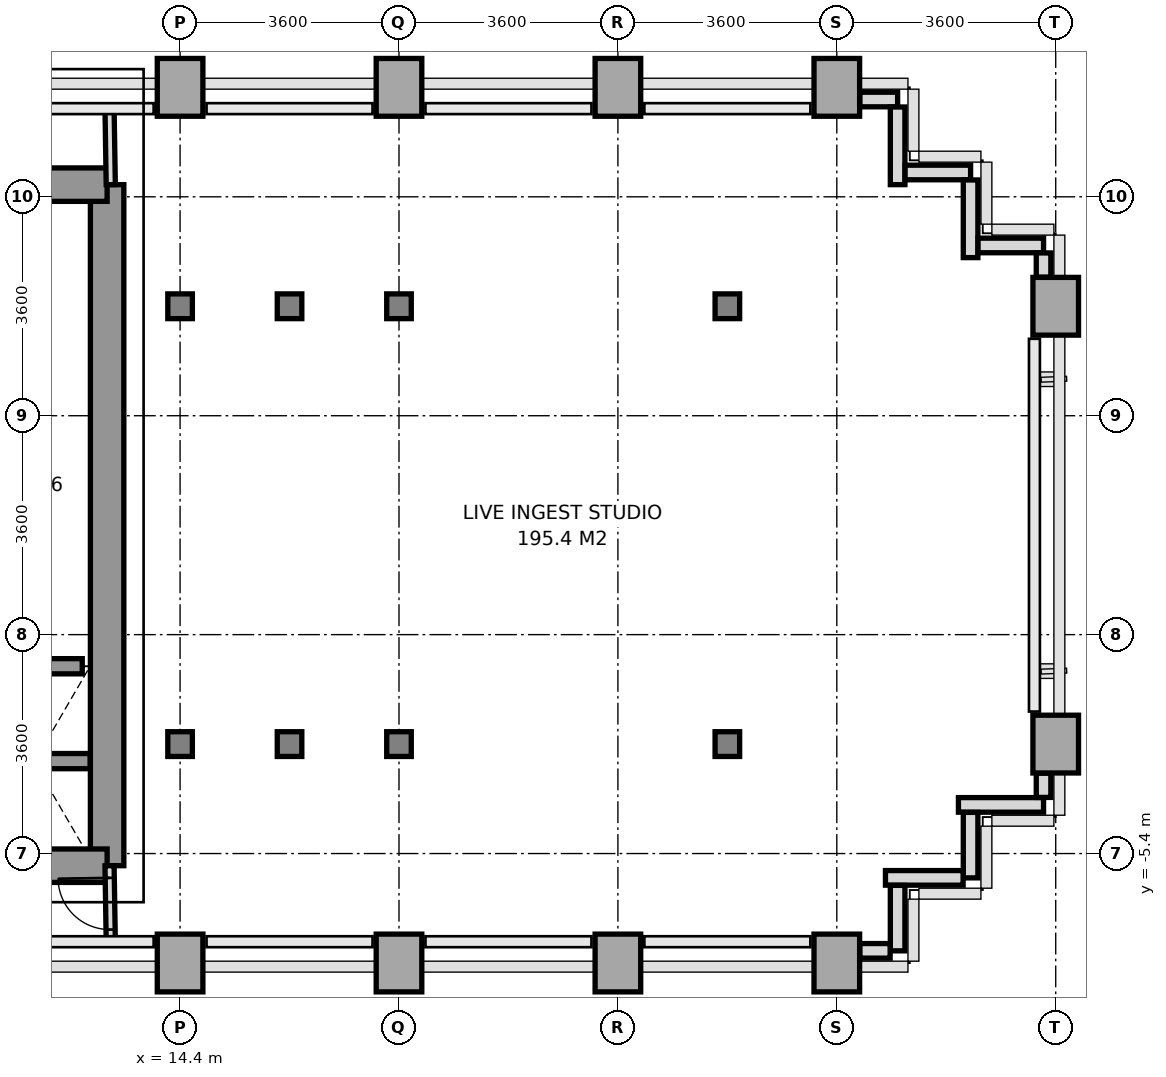
"""IFC4 building model, lengths in metres.
Left out: names, types, materials, properties, quantities, classifications, styles, units other than length and angle.
Written with IfcOpenShell. Run it as: python <this file> out.ifc"""

import sys

from ifc_helpers import new_model, si_unit, direction, frame, frame_2d, origin, origin_2d, place, context, subcontext, project, spatial, rectangle, i_section, extrude, source, transform, mapped, element, fill, save


model = new_model("IFC4")
c1 = context("Model", 3, precision=1e-05, world=origin(), true_north=direction((0.0, 1.0)))
c2 = subcontext(c1, "Body", "Model", "MODEL_VIEW")
j1 = project(units=[si_unit("LENGTHUNIT", "METRE"), si_unit("PLANEANGLEUNIT", "RADIAN")], contexts=[c1])
p1 = place(None, origin())
s1 = spatial("IfcSite", under=j1, at=p1, CompositionType="ELEMENT")
p2 = place(p1, origin())
s2 = spatial("IfcBuilding", under=s1, at=p2, CompositionType="ELEMENT")
p3 = place(p2, frame((0.0, 0.0, 37.4)))
s3 = spatial("IfcBuildingStorey", under=s2, at=p3, CompositionType="ELEMENT", Elevation=37.4)
m1 = source(origin(), c2, "Body", "SweptSolid", [
    extrude(rectangle(XDim=0.75, YDim=0.95, at=origin_2d()), origin(), (0.0, 0.0, 1.0), 3.2),
])
p4 = place(p3, frame((14.4, -7.2, 0.0), z_axis=(0.0, 0.0, 1.0), x_axis=(1.0, 0.0, 0.0)))
e1 = element("IfcColumn", 1, at=p4, inside=s3, PredefinedType="COLUMN", context=c2, shape_type="MappedRepresentation", body=[
    mapped(m1, transform((0.0, 0.0, 0.0), x_axis=(1.0, 0.0, 0.0), y_axis=(0.0, 1.0, 0.0), z_axis=(0.0, 0.0, 1.0), scale=1.0)),
])
m2 = source(origin(), c2, "Body", "SweptSolid", [
    extrude(i_section(OverallWidth=0.404, OverallDepth=0.407, WebThickness=0.022, FlangeThickness=0.035, at=origin_2d()), origin(), (0.0, 0.0, 1.0), 3.2),
])
for number, where, z_axis, x_axis in (
    (2, (14.4, -3.6, 0.0), (0.0, 0.0, 1.0), (1.0, 0.0, 0.0)),
    (3, (14.4, 3.6, 0.0), (0.0, 0.0, 1.0), (1.0, 0.0, 0.0)),
):
    element("IfcColumn", number, at=place(p3, frame(where, z_axis=z_axis, x_axis=x_axis)), inside=s3, PredefinedType="COLUMN", context=c2, shape_type="MappedRepresentation", body=[
        mapped(m2, transform((0.0, 0.0, 0.0), x_axis=(1.0, 0.0, 0.0), y_axis=(0.0, 1.0, 0.0), z_axis=(0.0, 0.0, 1.0), scale=1.0)),
    ])
p5 = place(p3, frame((14.4, 7.2, 0.0), z_axis=(0.0, 0.0, 1.0), x_axis=(1.0, 0.0, 0.0)))
e4 = element("IfcColumn", 4, at=p5, inside=s3, PredefinedType="COLUMN", context=c2, shape_type="MappedRepresentation", body=[
    mapped(m1, transform((0.0, 0.0, 0.0), x_axis=(1.0, 0.0, 0.0), y_axis=(0.0, 1.0, 0.0), z_axis=(0.0, 0.0, 1.0), scale=1.0)),
])
for number, where, z_axis, x_axis in (
    (5, (16.2, -3.6, 0.0), (0.0, 0.0, 1.0), (1.0, 0.0, 0.0)),
    (6, (16.2, 3.6, 0.0), (0.0, 0.0, 1.0), (1.0, 0.0, 0.0)),
):
    element("IfcColumn", number, at=place(p3, frame(where, z_axis=z_axis, x_axis=x_axis)), inside=s3, PredefinedType="COLUMN", context=c2, shape_type="MappedRepresentation", body=[
        mapped(m2, transform((0.0, 0.0, 0.0), x_axis=(1.0, 0.0, 0.0), y_axis=(0.0, 1.0, 0.0), z_axis=(0.0, 0.0, 1.0), scale=1.0)),
    ])
p6 = place(p3, frame((18.0, -7.2, 0.0), z_axis=(0.0, 0.0, 1.0), x_axis=(1.0, 0.0, 0.0)))
e7 = element("IfcColumn", 7, at=p6, inside=s3, PredefinedType="COLUMN", context=c2, shape_type="MappedRepresentation", body=[
    mapped(m1, transform((0.0, 0.0, 0.0), x_axis=(1.0, 0.0, 0.0), y_axis=(0.0, 1.0, 0.0), z_axis=(0.0, 0.0, 1.0), scale=1.0)),
])
for number, where, z_axis, x_axis in (
    (8, (18.0, -3.6, 0.0), (0.0, 0.0, 1.0), (1.0, 0.0, 0.0)),
    (9, (18.0, 3.6, 0.0), (0.0, 0.0, 1.0), (1.0, 0.0, 0.0)),
):
    element("IfcColumn", number, at=place(p3, frame(where, z_axis=z_axis, x_axis=x_axis)), inside=s3, PredefinedType="COLUMN", context=c2, shape_type="MappedRepresentation", body=[
        mapped(m2, transform((0.0, 0.0, 0.0), x_axis=(1.0, 0.0, 0.0), y_axis=(0.0, 1.0, 0.0), z_axis=(0.0, 0.0, 1.0), scale=1.0)),
    ])
for number, where, z_axis, x_axis in (
    (10, (18.0, 7.2, 0.0), (0.0, 0.0, 1.0), (1.0, 0.0, 0.0)),
    (11, (21.6, -7.2, 0.0), (0.0, 0.0, 1.0), (1.0, 0.0, 0.0)),
    (12, (21.6, 7.2, 0.0), (0.0, 0.0, 1.0), (1.0, 0.0, 0.0)),
):
    element("IfcColumn", number, at=place(p3, frame(where, z_axis=z_axis, x_axis=x_axis)), inside=s3, PredefinedType="COLUMN", context=c2, shape_type="MappedRepresentation", body=[
        mapped(m1, transform((0.0, 0.0, 0.0), x_axis=(1.0, 0.0, 0.0), y_axis=(0.0, 1.0, 0.0), z_axis=(0.0, 0.0, 1.0), scale=1.0)),
    ])
for number, where, z_axis, x_axis in (
    (13, (23.4, -3.6, 0.0), (0.0, 0.0, 1.0), (1.0, 0.0, 0.0)),
    (14, (23.4, 3.6, 0.0), (0.0, 0.0, 1.0), (1.0, 0.0, 0.0)),
):
    element("IfcColumn", number, at=place(p3, frame(where, z_axis=z_axis, x_axis=x_axis)), inside=s3, PredefinedType="COLUMN", context=c2, shape_type="MappedRepresentation", body=[
        mapped(m2, transform((0.0, 0.0, 0.0), x_axis=(1.0, 0.0, 0.0), y_axis=(0.0, 1.0, 0.0), z_axis=(0.0, 0.0, 1.0), scale=1.0)),
    ])
for number, where, z_axis, x_axis in (
    (15, (25.2, -7.2, 0.0), (0.0, 0.0, 1.0), (1.0, 0.0, 0.0)),
    (16, (25.2, 7.2, 0.0), (0.0, 0.0, 1.0), (1.0, 0.0, 0.0)),
    (17, (28.8, -3.6, 0.0), (0.0, 0.0, 1.0), (1.0, 0.0, 0.0)),
    (18, (28.8, 3.6, 0.0), (0.0, 0.0, 1.0), (1.0, 0.0, 0.0)),
):
    element("IfcColumn", number, at=place(p3, frame(where, z_axis=z_axis, x_axis=x_axis)), inside=s3, PredefinedType="COLUMN", context=c2, shape_type="MappedRepresentation", body=[
        mapped(m1, transform((0.0, 0.0, 0.0), x_axis=(1.0, 0.0, 0.0), y_axis=(0.0, 1.0, 0.0), z_axis=(0.0, 0.0, 1.0), scale=1.0)),
    ])
p7 = place(p3, frame((28.6, -4.6, 0.0), z_axis=(0.0, 0.0, 1.0), x_axis=(-1.0, 0.0, 0.0)))
e19 = element("IfcWall", 19, at=p7, inside=s3, PredefinedType="PARAPET", context=c2, shape_type="SweptSolid", body=[
    extrude(rectangle(XDim=1.4, YDim=0.24, at=frame_2d((0.7, 0.0))), origin(), (0.0, 0.0, 1.0), 1.15),
])
p8 = place(p3, frame((27.4, -4.723, 0.0), z_axis=(0.0, 0.0, 1.0), x_axis=(0.0, -1.0, 0.0)))
e20 = element("IfcWall", 20, at=p8, inside=s3, PredefinedType="PARAPET", context=c2, shape_type="SweptSolid", body=[
    extrude(rectangle(XDim=1.077, YDim=0.24, at=frame_2d((0.539, 0.0))), origin(), (0.0, 0.0, 1.0), 1.15),
])
p9 = place(p3, frame((27.277, -5.8, 0.0), z_axis=(0.0, 0.0, 1.0), x_axis=(-1.0, 0.0, 0.0)))
e21 = element("IfcWall", 21, at=p9, inside=s3, PredefinedType="PARAPET", context=c2, shape_type="SweptSolid", body=[
    extrude(rectangle(XDim=1.277, YDim=0.24, at=frame_2d((0.639, 0.0))), origin(), (0.0, 0.0, 1.0), 1.15),
])
p10 = place(p3, frame((26.2, -5.923, 0.0), z_axis=(0.0, 0.0, 1.0), x_axis=(0.0, -1.0, 0.0)))
e22 = element("IfcWall", 22, at=p10, inside=s3, PredefinedType="PARAPET", context=c2, shape_type="SweptSolid", body=[
    extrude(rectangle(XDim=1.077, YDim=0.24, at=frame_2d((0.539, 0.0))), origin(), (0.0, 0.0, 1.0), 1.15),
])
p11 = place(p3, frame((26.077, -7.0, 0.0), z_axis=(0.0, 0.0, 1.0), x_axis=(-1.0, 0.0, 0.0)))
e23 = element("IfcWall", 23, at=p11, inside=s3, PredefinedType="PARAPET", context=c2, shape_type="SweptSolid", body=[
    extrude(rectangle(XDim=0.499, YDim=0.24, at=frame_2d((0.25, 0.0))), origin(), (0.0, 0.0, 1.0), 1.15),
])
p12 = place(p3, frame((25.578, 7.0, 0.0), z_axis=(0.0, 0.0, 1.0), x_axis=(1.0, 0.0, 0.0)))
e24 = element("IfcWall", 24, at=p12, inside=s3, PredefinedType="PARAPET", context=c2, shape_type="SweptSolid", body=[
    extrude(rectangle(XDim=0.622, YDim=0.24, at=frame_2d((0.311, 0.0))), origin(), (0.0, 0.0, 1.0), 1.15),
])
p13 = place(p3, frame((26.2, 6.877, 0.0), z_axis=(0.0, 0.0, 1.0), x_axis=(0.0, -1.0, 0.0)))
e25 = element("IfcWall", 25, at=p13, inside=s3, PredefinedType="PARAPET", context=c2, shape_type="SweptSolid", body=[
    extrude(rectangle(XDim=1.277, YDim=0.24, at=frame_2d((0.638, 0.0))), origin(), (0.0, 0.0, 1.0), 1.15),
])
p14 = place(p3, frame((26.323, 5.8, 0.0), z_axis=(0.0, 0.0, 1.0), x_axis=(1.0, 0.0, 0.0)))
e26 = element("IfcWall", 26, at=p14, inside=s3, PredefinedType="PARAPET", context=c2, shape_type="SweptSolid", body=[
    extrude(rectangle(XDim=1.077, YDim=0.24, at=frame_2d((0.539, 0.0))), origin(), (0.0, 0.0, 1.0), 1.15),
])
p15 = place(p3, frame((27.4, 5.677, 0.0), z_axis=(0.0, 0.0, 1.0), x_axis=(0.0, -1.0, 0.0)))
e27 = element("IfcWall", 27, at=p15, inside=s3, PredefinedType="PARAPET", context=c2, shape_type="SweptSolid", body=[
    extrude(rectangle(XDim=1.277, YDim=0.24, at=frame_2d((0.639, 0.0))), origin(), (0.0, 0.0, 1.0), 1.15),
])
p16 = place(p3, frame((27.523, 4.6, 0.0), z_axis=(0.0, 0.0, 1.0), x_axis=(1.0, 0.0, 0.0)))
e28 = element("IfcWall", 28, at=p16, inside=s3, PredefinedType="PARAPET", context=c2, shape_type="SweptSolid", body=[
    extrude(rectangle(XDim=1.077, YDim=0.24, at=frame_2d((0.539, 0.0))), origin(), (0.0, 0.0, 1.0), 1.15),
])
for number, where, z_axis, x_axis in (
    (29, (28.6, 4.477, 0.0), (0.0, 0.0, 1.0), (0.0, -1.0, 0.0)),
    (30, (28.6, -4.078, 0.0), (0.0, 0.0, 1.0), (0.0, -1.0, 0.0)),
):
    element("IfcWall", number, at=place(p3, frame(where, z_axis=z_axis, x_axis=x_axis)), inside=s3, PredefinedType="PARAPET", context=c2, shape_type="SweptSolid", body=[
        extrude(rectangle(XDim=0.399, YDim=0.24, at=frame_2d((0.2, 0.0))), origin(), (0.0, 0.0, 1.0), 1.15),
    ])
p17 = place(p3, frame((13.2, -5.6, 0.0), z_axis=(0.0, 0.0, 1.0), x_axis=(0.0, 1.0, 0.0)))
e31 = element("IfcWall", 31, at=p17, inside=s3, PredefinedType="SHEAR", context=c2, shape_type="SweptSolid", body=[
    extrude(rectangle(XDim=11.2, YDim=0.55, at=frame_2d((5.6, 0.0))), origin(), (0.0, 0.0, 1.0), 3.2),
])
p18 = place(p3, frame((11.381, 5.6, 0.0), z_axis=(0.0, 0.0, 1.0), x_axis=(1.0, 0.0, 0.0)))
e32 = element("IfcWall", 32, at=p18, inside=s3, PredefinedType="SHEAR", context=c2, shape_type="SweptSolid", body=[
    extrude(rectangle(XDim=1.819, YDim=0.55, at=frame_2d((0.909, 0.0))), origin(), (0.0, 0.0, 1.0), 3.2),
])
p19 = place(p3, frame((5.4, -5.6, 0.0), z_axis=(0.0, 0.0, 1.0), x_axis=(1.0, 0.0, 0.0)))
e33 = element("IfcWall", 33, at=p19, inside=s3, PredefinedType="SHEAR", context=c2, shape_type="SweptSolid", body=[
    extrude(rectangle(XDim=7.8, YDim=0.55, at=frame_2d((3.9, 0.0))), origin(), (0.0, 0.0, 1.0), 3.2),
])
p20 = place(p19, frame((3.0, 0.0, 0.0)))
e34 = element("IfcOpeningElement", 34, at=p20, cuts=e33, PredefinedType="OPENING", context=c2, shape_type="SweptSolid", body=[
    extrude(rectangle(XDim=1.2, YDim=2.2, at=frame_2d((0.6, 1.1))), frame((0.0, 0.285, 0.0), z_axis=(0.0, -1.0, 0.0), x_axis=(1.0, 0.0, 0.0)), (0.0, 0.0, 1.0), 0.57),
])
p21 = place(p3, frame((11.08, -3.88, 0.0), z_axis=(0.0, 0.0, 1.0), x_axis=(1.0, 0.0, 0.0)))
e35 = element("IfcWall", 35, at=p21, inside=s3, PredefinedType="SOLIDWALL", context=c2, shape_type="SweptSolid", body=[
    extrude(rectangle(XDim=1.84, YDim=0.25, at=frame_2d((0.92, 0.0))), origin(), (0.0, 0.0, 1.0), 3.2),
])
p22 = place(p3, frame((11.209, -2.32, 0.0), z_axis=(0.0, 0.0, 1.0), x_axis=(1.0, 0.0, 0.0)))
e36 = element("IfcWall", 36, at=p22, inside=s3, PredefinedType="SOLIDWALL", context=c2, shape_type="SweptSolid", body=[
    extrude(rectangle(XDim=1.582, YDim=0.25, at=frame_2d((0.791, 0.0))), origin(), (0.0, 0.0, 1.0), 3.2),
])
p23 = place(p3, frame((13.26, 5.6, 0.0), z_axis=(0.0, 0.0, 1.0), x_axis=(-0.016013571389, 0.999871774545, 0.0)))
e37 = element("IfcWall", 37, at=p23, inside=s3, PredefinedType="PARTITIONING", context=c2, shape_type="SweptSolid", body=[
    extrude(rectangle(XDim=1.25, YDim=0.15, at=frame_2d((0.625, 0.0))), origin(), (0.0, 0.0, 1.0), 3.2),
])
p24 = place(p3, frame((13.26, -6.85, 0.0), z_axis=(0.0, 0.0, 1.0), x_axis=(-0.016013571389, 0.999871774545, 0.0)))
e38 = element("IfcWall", 38, at=p24, inside=s3, PredefinedType="PARTITIONING", context=c2, shape_type="SweptSolid", body=[
    extrude(rectangle(XDim=1.25, YDim=0.15, at=frame_2d((0.625, 0.0))), origin(), (0.0, 0.0, 1.0), 3.2),
])
p25 = place(p24, frame((0.2, 0.0, 0.0)))
e39 = element("IfcOpeningElement", 39, at=p25, cuts=e38, PredefinedType="OPENING", context=c2, shape_type="SweptSolid", body=[
    extrude(rectangle(XDim=0.85, YDim=2.1, at=frame_2d((0.425, 1.05))), frame((0.0, 0.085, 0.0), z_axis=(0.0, -1.0, 0.0), x_axis=(1.0, 0.0, 0.0)), (0.0, 0.0, 1.0), 0.17),
])
m3 = source(origin(), c2, "Body", "SweptSolid", [
    extrude(rectangle(XDim=0.85, YDim=2.1, at=frame_2d((0.425, 1.05))), frame((0.0, 0.025, 0.0), z_axis=(0.0, -1.0, 0.0), x_axis=(1.0, 0.0, 0.0)), (0.0, 0.0, 1.0), 0.05),
])
p26 = place(p25, origin())
e40 = element("IfcDoor", 40, at=p26, inside=s3, OperationType="SINGLE_SWING_RIGHT", PredefinedType="DOOR", context=c2, shape_type="MappedRepresentation", body=[
    mapped(m3, transform((0.0, 0.0, 0.0), x_axis=(1.0, 0.0, 0.0), y_axis=(0.0, 1.0, 0.0), z_axis=(0.0, 0.0, 1.0), scale=1.0)),
])
fill(e39, e40)
save(model, sys.argv[1])
